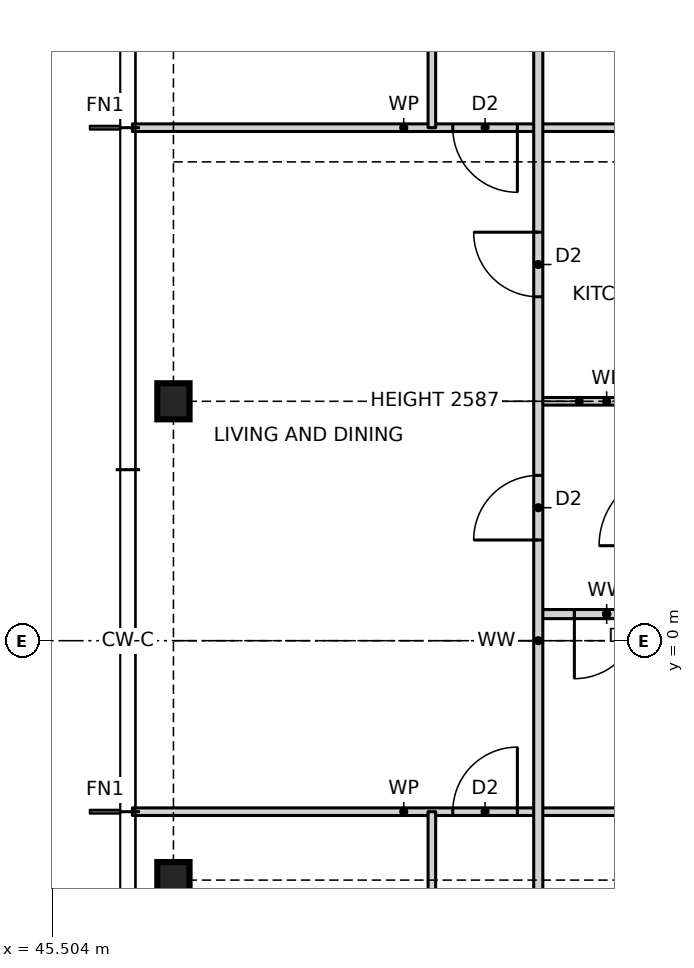
"""IFC4 building model, lengths in metres.
Left out: names, types, materials, properties, quantities, classifications, styles, units other than length and angle.
Written with IfcOpenShell. Run it as: python <this file> out.ifc"""

import sys

from ifc_helpers import new_model, si_unit, direction, frame, frame_2d, origin, origin_2d, place, context, subcontext, project, spatial, rectangle, i_section, extrude, element, fill, save


model = new_model("IFC4")
c1 = context("Model", 3, precision=1e-05, world=origin(), true_north=direction((0.0, 1.0)))
c2 = subcontext(c1, "Body", "Model", "MODEL_VIEW")
j1 = project(units=[si_unit("LENGTHUNIT", "METRE"), si_unit("PLANEANGLEUNIT", "RADIAN")], contexts=[c1])
p1 = place(None, origin())
s1 = spatial("IfcSite", under=j1, at=p1, CompositionType="ELEMENT")
p2 = place(p1, origin())
s2 = spatial("IfcBuilding", under=s1, at=p2, CompositionType="ELEMENT")
p3 = place(p2, frame((0.0, 0.0, 39.5)))
s3 = spatial("IfcBuildingStorey", under=s2, at=p3, CompositionType="ELEMENT", Elevation=39.5)
for number, where, z_axis, x_axis in (
    (1, (47.1, 3.15, 0.0), (0.0, 0.0, 1.0), (1.0, 0.0, 0.0)),
    (2, (47.1, -3.15, 0.0), (0.0, 0.0, 1.0), (1.0, 0.0, 0.0)),
):
    element("IfcColumn", number, at=place(p3, frame(where, z_axis=z_axis, x_axis=x_axis)), inside=s3, PredefinedType="COLUMN", context=c2, shape_type="SweptSolid", body=[
        extrude(i_section(OverallWidth=0.424, OverallDepth=0.475, WebThickness=0.048, FlangeThickness=0.077, at=origin_2d()), origin(), (0.0, 0.0, 1.0), 3.5),
    ])
p4 = place(p3, frame((46.56, -2.25, 0.0), z_axis=(0.0, 0.0, 1.0), x_axis=(1.0, 0.0, 0.0)))
e3 = element("IfcWall", 3, at=p4, inside=s3, PredefinedType="PARTITIONING", context=c2, shape_type="SweptSolid", body=[
    extrude(rectangle(XDim=7.14, YDim=0.1, at=frame_2d((3.57, 0.0))), origin(), (0.0, 0.0, 1.0), 3.27),
])
p5 = place(p4, frame((4.215, 0.0, 0.0)))
e4 = element("IfcOpeningElement", 4, at=p5, cuts=e3, PredefinedType="OPENING", context=c2, shape_type="SweptSolid", body=[
    extrude(rectangle(XDim=0.85, YDim=2.1, at=frame_2d((0.425, 1.05))), frame((0.0, 0.06, 0.0), z_axis=(0.0, -1.0, 0.0), x_axis=(1.0, 0.0, 0.0)), (0.0, 0.0, 1.0), 0.12),
])
p6 = place(p3, frame((51.9, 0.35, 0.0), z_axis=(0.0, 0.0, 1.0), x_axis=(1.0, 0.0, 0.0)))
e5 = element("IfcWall", 5, at=p6, inside=s3, PredefinedType="PARTITIONING", context=c2, shape_type="SweptSolid", body=[
    extrude(rectangle(XDim=1.8, YDim=0.12, at=frame_2d((0.9, 0.0))), origin(), (0.0, 0.0, 1.0), 3.27),
])
p7 = place(p6, frame((0.475, 0.0, 0.0)))
e6 = element("IfcOpeningElement", 6, at=p7, cuts=e5, PredefinedType="OPENING", context=c2, shape_type="SweptSolid", body=[
    extrude(rectangle(XDim=0.85, YDim=2.1, at=frame_2d((0.425, 1.05))), frame((0.0, 0.07, 0.0), z_axis=(0.0, -1.0, 0.0), x_axis=(1.0, 0.0, 0.0)), (0.0, 0.0, 1.0), 0.14),
])
p8 = place(p3, frame((51.9, 3.15, 0.0), z_axis=(0.0, 0.0, 1.0), x_axis=(1.0, 0.0, 0.0)))
e7 = element("IfcWall", 7, at=p8, inside=s3, PredefinedType="PARTITIONING", context=c2, shape_type="SweptSolid", body=[
    extrude(rectangle(XDim=1.8, YDim=0.1, at=frame_2d((0.9, 0.0))), origin(), (0.0, 0.0, 1.0), 2.587),
])
p9 = place(p3, frame((46.56, 6.75, 0.0), z_axis=(0.0, 0.0, 1.0), x_axis=(1.0, 0.0, 0.0)))
e8 = element("IfcWall", 8, at=p9, inside=s3, PredefinedType="PARTITIONING", context=c2, shape_type="SweptSolid", body=[
    extrude(rectangle(XDim=7.14, YDim=0.1, at=frame_2d((3.57, 0.0))), origin(), (0.0, 0.0, 1.0), 3.27),
])
p10 = place(p9, frame((4.215, 0.0, 0.0)))
e9 = element("IfcOpeningElement", 9, at=p10, cuts=e8, PredefinedType="OPENING", context=c2, shape_type="SweptSolid", body=[
    extrude(rectangle(XDim=0.85, YDim=2.1, at=frame_2d((0.425, 1.05))), frame((0.0, 0.06, 0.0), z_axis=(0.0, -1.0, 0.0), x_axis=(1.0, 0.0, 0.0)), (0.0, 0.0, 1.0), 0.12),
])
p11 = place(p3, frame((51.9, -12.614, 0.0), z_axis=(0.0, 0.0, 1.0), x_axis=(0.0, 1.0, 0.0)))
e10 = element("IfcWall", 10, at=p11, inside=s3, PredefinedType="PARTITIONING", context=c2, shape_type="SweptSolid", body=[
    extrude(rectangle(XDim=25.228, YDim=0.12, at=frame_2d((12.614, 0.0))), origin(), (0.0, 0.0, 1.0), 3.27),
])
p12 = place(p11, frame((17.139, 0.0, 0.0)))
e11 = element("IfcOpeningElement", 11, at=p12, cuts=e10, PredefinedType="OPENING", context=c2, shape_type="SweptSolid", body=[
    extrude(rectangle(XDim=0.85, YDim=2.1, at=frame_2d((0.425, 1.05))), frame((0.0, 0.07, 0.0), z_axis=(0.0, -1.0, 0.0), x_axis=(1.0, 0.0, 0.0)), (0.0, 0.0, 1.0), 0.14),
])
p13 = place(p11, frame((13.939, 0.0, 0.0)))
e12 = element("IfcOpeningElement", 12, at=p13, cuts=e10, PredefinedType="OPENING", context=c2, shape_type="SweptSolid", body=[
    extrude(rectangle(XDim=0.85, YDim=2.1, at=frame_2d((0.425, 1.05))), frame((0.0, 0.07, 0.0), z_axis=(0.0, -1.0, 0.0), x_axis=(1.0, 0.0, 0.0)), (0.0, 0.0, 1.0), 0.14),
])
p14 = place(p11, frame((21.871, 0.0, 0.0)))
e13 = element("IfcOpeningElement", 13, at=p14, cuts=e10, PredefinedType="OPENING", context=c2, shape_type="SweptSolid", body=[
    extrude(rectangle(XDim=0.85, YDim=2.1, at=frame_2d((0.425, 1.05))), frame((0.0, 0.07, 0.0), z_axis=(0.0, -1.0, 0.0), x_axis=(1.0, 0.0, 0.0)), (0.0, 0.0, 1.0), 0.14),
])
p15 = place(p11, frame((7.739, 0.0, 0.0)))
e14 = element("IfcOpeningElement", 14, at=p15, cuts=e10, PredefinedType="OPENING", context=c2, shape_type="SweptSolid", body=[
    extrude(rectangle(XDim=0.85, YDim=2.1, at=frame_2d((0.425, 1.05))), frame((0.0, 0.07, 0.0), z_axis=(0.0, -1.0, 0.0), x_axis=(1.0, 0.0, 0.0)), (0.0, 0.0, 1.0), 0.14),
])
p16 = place(p11, frame((2.557, 0.0, 0.0)))
e15 = element("IfcOpeningElement", 15, at=p16, cuts=e10, PredefinedType="OPENING", context=c2, shape_type="SweptSolid", body=[
    extrude(rectangle(XDim=0.85, YDim=2.1, at=frame_2d((0.425, 1.05))), frame((0.0, 0.07, 0.0), z_axis=(0.0, -1.0, 0.0), x_axis=(1.0, 0.0, 0.0)), (0.0, 0.0, 1.0), 0.14),
])
p17 = place(p3, frame((50.5, -13.45, 0.0), z_axis=(0.0, 0.0, 1.0), x_axis=(0.0, 1.0, 0.0)))
e16 = element("IfcWall", 16, at=p17, inside=s3, PredefinedType="PARTITIONING", context=c2, shape_type="SweptSolid", body=[
    extrude(rectangle(XDim=11.2, YDim=0.1, at=frame_2d((5.6, 0.0))), origin(), (0.0, 0.0, 1.0), 3.27),
])
p18 = place(p17, frame((8.525, 0.0, 0.0)))
e17 = element("IfcOpeningElement", 17, at=p18, cuts=e16, PredefinedType="OPENING", context=c2, shape_type="SweptSolid", body=[
    extrude(rectangle(XDim=0.85, YDim=2.1, at=frame_2d((0.425, 1.05))), frame((0.0, 0.06, 0.0), z_axis=(0.0, -1.0, 0.0), x_axis=(1.0, 0.0, 0.0)), (0.0, 0.0, 1.0), 0.12),
])
p19 = place(p17, frame((4.025, 0.0, 0.0)))
e18 = element("IfcOpeningElement", 18, at=p19, cuts=e16, PredefinedType="OPENING", context=c2, shape_type="SweptSolid", body=[
    extrude(rectangle(XDim=0.85, YDim=2.1, at=frame_2d((0.425, 1.05))), frame((0.0, 0.06, 0.0), z_axis=(0.0, -1.0, 0.0), x_axis=(1.0, 0.0, 0.0)), (0.0, 0.0, 1.0), 0.12),
])
p20 = place(p17, frame((0.675, 0.0, 0.0)))
e19 = element("IfcOpeningElement", 19, at=p20, cuts=e16, PredefinedType="OPENING", context=c2, shape_type="SweptSolid", body=[
    extrude(rectangle(XDim=0.85, YDim=2.1, at=frame_2d((0.425, 1.05))), frame((0.0, 0.06, 0.0), z_axis=(0.0, -1.0, 0.0), x_axis=(1.0, 0.0, 0.0)), (0.0, 0.0, 1.0), 0.12),
])
p21 = place(p3, frame((50.5, 6.75, 0.0), z_axis=(0.0, 0.0, 1.0), x_axis=(0.0, 1.0, 0.0)))
e20 = element("IfcWall", 20, at=p21, inside=s3, PredefinedType="PARTITIONING", context=c2, shape_type="SweptSolid", body=[
    extrude(rectangle(XDim=6.7, YDim=0.1, at=frame_2d((3.35, 0.0))), origin(), (0.0, 0.0, 1.0), 3.27),
])
p22 = place(p21, frame((1.825, 0.0, 0.0)))
e21 = element("IfcOpeningElement", 21, at=p22, cuts=e20, PredefinedType="OPENING", context=c2, shape_type="SweptSolid", body=[
    extrude(rectangle(XDim=0.85, YDim=2.1, at=frame_2d((0.425, 1.05))), frame((0.0, 0.06, 0.0), z_axis=(0.0, -1.0, 0.0), x_axis=(1.0, 0.0, 0.0)), (0.0, 0.0, 1.0), 0.12),
])
p23 = place(p21, frame((5.175, 0.0, 0.0)))
e22 = element("IfcOpeningElement", 22, at=p23, cuts=e20, PredefinedType="OPENING", context=c2, shape_type="SweptSolid", body=[
    extrude(rectangle(XDim=0.85, YDim=2.1, at=frame_2d((0.425, 1.05))), frame((0.0, 0.06, 0.0), z_axis=(0.0, -1.0, 0.0), x_axis=(1.0, 0.0, 0.0)), (0.0, 0.0, 1.0), 0.12),
])
p24 = place(p12, origin())
e23 = element("IfcDoor", 23, at=p24, inside=s3, OperationType="SINGLE_SWING_RIGHT", PredefinedType="DOOR", context=c2, shape_type="SweptSolid", body=[
    extrude(rectangle(XDim=0.85, YDim=2.1, at=frame_2d((0.425, 1.05))), frame((0.0, 0.025, 0.0), z_axis=(0.0, -1.0, 0.0), x_axis=(1.0, 0.0, 0.0)), (0.0, 0.0, 1.0), 0.05),
])
fill(e11, e23)
p25 = place(p13, origin())
e24 = element("IfcDoor", 24, at=p25, inside=s3, OperationType="SINGLE_SWING_LEFT", PredefinedType="DOOR", context=c2, shape_type="SweptSolid", body=[
    extrude(rectangle(XDim=0.85, YDim=2.1, at=frame_2d((0.425, 1.05))), frame((0.0, 0.025, 0.0), z_axis=(0.0, -1.0, 0.0), x_axis=(1.0, 0.0, 0.0)), (0.0, 0.0, 1.0), 0.05),
])
fill(e12, e24)
p26 = place(p7, frame((0.85, 0.0, 0.0), z_axis=(0.0, 0.0, 1.0), x_axis=(-1.0, 0.0, 0.0)))
e25 = element("IfcDoor", 25, at=p26, inside=s3, OperationType="SINGLE_SWING_RIGHT", PredefinedType="DOOR", context=c2, shape_type="SweptSolid", body=[
    extrude(rectangle(XDim=0.85, YDim=2.1, at=frame_2d((0.425, 1.05))), frame((0.0, 0.025, 0.0), z_axis=(0.0, -1.0, 0.0), x_axis=(1.0, 0.0, 0.0)), (0.0, 0.0, 1.0), 0.05),
])
fill(e6, e25)
p27 = place(p10, frame((0.85, 0.0, 0.0), z_axis=(0.0, 0.0, 1.0), x_axis=(-1.0, 0.0, 0.0)))
e26 = element("IfcDoor", 26, at=p27, inside=s3, OperationType="SINGLE_SWING_LEFT", PredefinedType="DOOR", context=c2, shape_type="SweptSolid", body=[
    extrude(rectangle(XDim=0.85, YDim=2.1, at=frame_2d((0.425, 1.05))), frame((0.0, 0.025, 0.0), z_axis=(0.0, -1.0, 0.0), x_axis=(1.0, 0.0, 0.0)), (0.0, 0.0, 1.0), 0.05),
])
fill(e9, e26)
p28 = place(p5, origin())
e27 = element("IfcDoor", 27, at=p28, inside=s3, OperationType="SINGLE_SWING_RIGHT", PredefinedType="DOOR", context=c2, shape_type="SweptSolid", body=[
    extrude(rectangle(XDim=0.85, YDim=2.1, at=frame_2d((0.425, 1.05))), frame((0.0, 0.025, 0.0), z_axis=(0.0, -1.0, 0.0), x_axis=(1.0, 0.0, 0.0)), (0.0, 0.0, 1.0), 0.05),
])
fill(e4, e27)
save(model, sys.argv[1])
